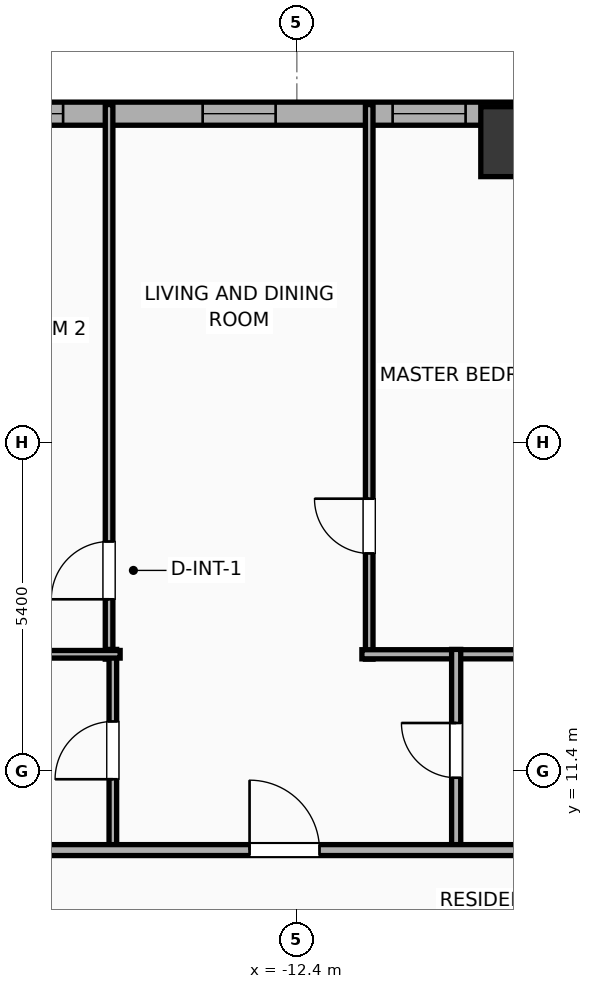
"""IFC4 building model, lengths in metres.
Left out: names, types, materials, properties, quantities, classifications, styles, units other than length and angle.
Written with IfcOpenShell. Run it as: python <this file> out.ifc"""

import sys

from ifc_helpers import new_model, si_unit, direction, frame, frame_2d, origin, origin_2d, place, context, subcontext, project, spatial, rectangle, hollow_rectangle, extrude, element, fill, save


model = new_model("IFC4")
c1 = context("Model", 3, precision=1e-05, world=origin(), true_north=direction((0.0, 1.0)))
c2 = subcontext(c1, "Body", "Model", "MODEL_VIEW")
j1 = project(units=[si_unit("LENGTHUNIT", "METRE"), si_unit("PLANEANGLEUNIT", "RADIAN")], contexts=[c1])
p1 = place(None, origin())
s1 = spatial("IfcSite", under=j1, at=p1, CompositionType="ELEMENT")
p2 = place(p1, origin())
s2 = spatial("IfcBuilding", under=s1, at=p2, CompositionType="ELEMENT")
p3 = place(p2, frame((0.0, 0.0, 41.6)))
s3 = spatial("IfcBuildingStorey", under=s2, at=p3, CompositionType="ELEMENT", Elevation=41.6)
p4 = place(p3, frame((-8.8, 21.75, 0.0), z_axis=(0.0, 0.0, 1.0), x_axis=(1.0, 0.0, 0.0)))
e1 = element("IfcColumn", 1, at=p4, inside=s3, PredefinedType="COLUMN", context=c2, shape_type="SweptSolid", body=[
    extrude(hollow_rectangle(XDim=1.15, YDim=1.15, WallThickness=0.04, at=origin_2d()), origin(), (0.0, 0.0, 1.0), 3.9),
])
p5 = place(p3, frame((-29.581, 22.21, 0.0), z_axis=(0.0, 0.0, 1.0), x_axis=(1.0, 0.0, 0.0)))
e2 = element("IfcWall", 2, at=p5, inside=s3, PredefinedType="ELEMENTEDWALL", context=c2, shape_type="SweptSolid", body=[
    extrude(rectangle(XDim=51.963, YDim=0.38, at=frame_2d((25.981, 0.0))), origin(), (0.0, 0.0, 1.0), 3.65),
])
p6 = place(p5, frame((25.631, 0.0, 0.75)))
e3 = element("IfcOpeningElement", 3, at=p6, cuts=e2, PredefinedType="OPENING", context=c2, shape_type="SweptSolid", body=[
    extrude(rectangle(XDim=2.4, YDim=2.1, at=frame_2d((1.2, 1.05))), frame((0.0, 0.2, 0.0), z_axis=(0.0, -1.0, 0.0), x_axis=(1.0, 0.0, 0.0)), (0.0, 0.0, 1.0), 0.4),
])
p7 = place(p5, frame((42.952, 0.0, 0.75)))
e4 = element("IfcOpeningElement", 4, at=p7, cuts=e2, PredefinedType="OPENING", context=c2, shape_type="SweptSolid", body=[
    extrude(rectangle(XDim=2.4, YDim=2.1, at=frame_2d((1.2, 1.05))), frame((0.0, 0.2, 0.0), z_axis=(0.0, -1.0, 0.0), x_axis=(1.0, 0.0, 0.0)), (0.0, 0.0, 1.0), 0.4),
])
p8 = place(p5, frame((1.731, 0.0, 0.75)))
e5 = element("IfcOpeningElement", 5, at=p8, cuts=e2, PredefinedType="OPENING", context=c2, shape_type="SweptSolid", body=[
    extrude(rectangle(XDim=1.2, YDim=2.05, at=frame_2d((0.6, 1.025))), frame((0.0, 0.2, 0.0), z_axis=(0.0, -1.0, 0.0), x_axis=(1.0, 0.0, 0.0)), (0.0, 0.0, 1.0), 0.4),
])
p9 = place(p5, frame((5.272, 0.0, 0.75)))
e6 = element("IfcOpeningElement", 6, at=p9, cuts=e2, PredefinedType="OPENING", context=c2, shape_type="SweptSolid", body=[
    extrude(rectangle(XDim=1.2, YDim=2.05, at=frame_2d((0.6, 1.025))), frame((0.0, 0.2, 0.0), z_axis=(0.0, -1.0, 0.0), x_axis=(1.0, 0.0, 0.0)), (0.0, 0.0, 1.0), 0.4),
])
p10 = place(p5, frame((8.356, 0.0, 0.75)))
e7 = element("IfcOpeningElement", 7, at=p10, cuts=e2, PredefinedType="OPENING", context=c2, shape_type="SweptSolid", body=[
    extrude(rectangle(XDim=1.2, YDim=2.05, at=frame_2d((0.6, 1.025))), frame((0.0, 0.2, 0.0), z_axis=(0.0, -1.0, 0.0), x_axis=(1.0, 0.0, 0.0)), (0.0, 0.0, 1.0), 0.4),
])
p11 = place(p5, frame((15.632, 0.0, 0.75)))
e8 = element("IfcOpeningElement", 8, at=p11, cuts=e2, PredefinedType="OPENING", context=c2, shape_type="SweptSolid", body=[
    extrude(rectangle(XDim=1.2, YDim=2.05, at=frame_2d((0.6, 1.025))), frame((0.0, 0.2, 0.0), z_axis=(0.0, -1.0, 0.0), x_axis=(1.0, 0.0, 0.0)), (0.0, 0.0, 1.0), 0.4),
])
p12 = place(p5, frame((12.137, 0.0, 0.75)))
e9 = element("IfcOpeningElement", 9, at=p12, cuts=e2, PredefinedType="OPENING", context=c2, shape_type="SweptSolid", body=[
    extrude(rectangle(XDim=1.2, YDim=2.05, at=frame_2d((0.6, 1.025))), frame((0.0, 0.2, 0.0), z_axis=(0.0, -1.0, 0.0), x_axis=(1.0, 0.0, 0.0)), (0.0, 0.0, 1.0), 0.4),
])
p13 = place(p5, frame((18.756, 0.0, 0.75)))
e10 = element("IfcOpeningElement", 10, at=p13, cuts=e2, PredefinedType="OPENING", context=c2, shape_type="SweptSolid", body=[
    extrude(rectangle(XDim=1.2, YDim=2.05, at=frame_2d((0.6, 1.025))), frame((0.0, 0.2, 0.0), z_axis=(0.0, -1.0, 0.0), x_axis=(1.0, 0.0, 0.0)), (0.0, 0.0, 1.0), 0.4),
])
p14 = place(p5, frame((22.907, 0.0, 0.75)))
e11 = element("IfcOpeningElement", 11, at=p14, cuts=e2, PredefinedType="OPENING", context=c2, shape_type="SweptSolid", body=[
    extrude(rectangle(XDim=1.2, YDim=2.05, at=frame_2d((0.6, 1.025))), frame((0.0, 0.2, 0.0), z_axis=(0.0, -1.0, 0.0), x_axis=(1.0, 0.0, 0.0)), (0.0, 0.0, 1.0), 0.4),
])
p15 = place(p5, frame((36.381, 0.0, 0.75)))
e12 = element("IfcOpeningElement", 12, at=p15, cuts=e2, PredefinedType="OPENING", context=c2, shape_type="SweptSolid", body=[
    extrude(rectangle(XDim=1.2, YDim=2.05, at=frame_2d((0.6, 1.025))), frame((0.0, 0.2, 0.0), z_axis=(0.0, -1.0, 0.0), x_axis=(1.0, 0.0, 0.0)), (0.0, 0.0, 1.0), 0.4),
])
p16 = place(p5, frame((32.886, 0.0, 0.75)))
e13 = element("IfcOpeningElement", 13, at=p16, cuts=e2, PredefinedType="OPENING", context=c2, shape_type="SweptSolid", body=[
    extrude(rectangle(XDim=1.2, YDim=2.05, at=frame_2d((0.6, 1.025))), frame((0.0, 0.2, 0.0), z_axis=(0.0, -1.0, 0.0), x_axis=(1.0, 0.0, 0.0)), (0.0, 0.0, 1.0), 0.4),
])
p17 = place(p5, frame((39.556, 0.0, 0.75)))
e14 = element("IfcOpeningElement", 14, at=p17, cuts=e2, PredefinedType="OPENING", context=c2, shape_type="SweptSolid", body=[
    extrude(rectangle(XDim=1.2, YDim=2.05, at=frame_2d((0.6, 1.025))), frame((0.0, 0.2, 0.0), z_axis=(0.0, -1.0, 0.0), x_axis=(1.0, 0.0, 0.0)), (0.0, 0.0, 1.0), 0.4),
])
p18 = place(p5, frame((46.885, 0.0, 0.75)))
e15 = element("IfcOpeningElement", 15, at=p18, cuts=e2, PredefinedType="OPENING", context=c2, shape_type="SweptSolid", body=[
    extrude(rectangle(XDim=1.2, YDim=2.05, at=frame_2d((0.6, 1.025))), frame((0.0, 0.2, 0.0), z_axis=(0.0, -1.0, 0.0), x_axis=(1.0, 0.0, 0.0)), (0.0, 0.0, 1.0), 0.4),
])
p19 = place(p5, frame((49.531, 0.0, 0.75)))
e16 = element("IfcOpeningElement", 16, at=p19, cuts=e2, PredefinedType="OPENING", context=c2, shape_type="SweptSolid", body=[
    extrude(rectangle(XDim=1.2, YDim=2.05, at=frame_2d((0.6, 1.025))), frame((0.0, 0.2, 0.0), z_axis=(0.0, -1.0, 0.0), x_axis=(1.0, 0.0, 0.0)), (0.0, 0.0, 1.0), 0.4),
])
p20 = place(p3, frame((-15.488, 13.24, 0.0), z_axis=(0.0, 0.0, 1.0), x_axis=(0.0, 1.0, 0.0)))
e17 = element("IfcWall", 17, at=p20, inside=s3, PredefinedType="PARTITIONING", context=c2, shape_type="SweptSolid", body=[
    extrude(rectangle(XDim=9.12, YDim=0.125, at=frame_2d((4.56, 0.0))), origin(), (0.0, 0.0, 1.0), 3.65),
])
p21 = place(p20, frame((0.984, 0.0, 0.0)))
e18 = element("IfcOpeningElement", 18, at=p21, cuts=e17, PredefinedType="OPENING", context=c2, shape_type="SweptSolid", body=[
    extrude(rectangle(XDim=0.95, YDim=2.05, at=frame_2d((0.475, 1.025))), frame((0.0, 0.073, 0.0), z_axis=(0.0, -1.0, 0.0), x_axis=(1.0, 0.0, 0.0)), (0.0, 0.0, 1.0), 0.145),
])
p22 = place(p3, frame((-11.21, 13.24, 0.0), z_axis=(0.0, 0.0, 1.0), x_axis=(0.0, 1.0, 0.0)))
e19 = element("IfcWall", 19, at=p22, inside=s3, PredefinedType="PARTITIONING", context=c2, shape_type="SweptSolid", body=[
    extrude(rectangle(XDim=9.12, YDim=0.125, at=frame_2d((4.56, 0.0))), origin(), (0.0, 0.0, 1.0), 3.65),
])
p23 = place(p22, frame((1.739, 0.0, 0.0)))
e20 = element("IfcOpeningElement", 20, at=p23, cuts=e19, PredefinedType="OPENING", context=c2, shape_type="SweptSolid", body=[
    extrude(rectangle(XDim=0.9, YDim=2.05, at=frame_2d((0.45, 1.025))), frame((0.0, 0.073, 0.0), z_axis=(0.0, -1.0, 0.0), x_axis=(1.0, 0.0, 0.0)), (0.0, 0.0, 1.0), 0.145),
])
p24 = place(p3, frame((-11.33, 13.32, 0.0), z_axis=(0.0, 0.0, 1.0), x_axis=(1.0, 0.0, 0.0)))
e21 = element("IfcWall", 21, at=p24, inside=s3, PredefinedType="PLUMBINGWALL", context=c2, shape_type="SweptSolid", body=[
    extrude(rectangle(XDim=3.79, YDim=0.15, at=frame_2d((1.895, 0.0))), origin(), (0.0, 0.0, 1.0), 3.65),
])
p25 = place(p3, frame((-15.426, 10.08, 0.0), z_axis=(0.0, 0.0, 1.0), x_axis=(0.0, 1.0, 0.0)))
e22 = element("IfcWall", 22, at=p25, inside=s3, PredefinedType="PARTITIONING", context=c2, shape_type="SweptSolid", body=[
    extrude(rectangle(XDim=3.32, YDim=0.125, at=frame_2d((1.66, 0.0))), origin(), (0.0, 0.0, 1.0), 3.65),
])
p26 = place(p25, frame((1.185, 0.0, 0.0)))
e23 = element("IfcOpeningElement", 23, at=p26, cuts=e22, PredefinedType="OPENING", context=c2, shape_type="SweptSolid", body=[
    extrude(rectangle(XDim=0.95, YDim=2.05, at=frame_2d((0.475, 1.025))), frame((0.0, 0.073, 0.0), z_axis=(0.0, -1.0, 0.0), x_axis=(1.0, 0.0, 0.0)), (0.0, 0.0, 1.0), 0.145),
])
p27 = place(p3, frame((-18.275, 13.32, 0.0), z_axis=(0.0, 0.0, 1.0), x_axis=(1.0, 0.0, 0.0)))
e24 = element("IfcWall", 24, at=p27, inside=s3, PredefinedType="PARTITIONING", context=c2, shape_type="SweptSolid", body=[
    extrude(rectangle(XDim=2.969, YDim=0.125, at=frame_2d((1.484, 0.0))), origin(), (0.0, 0.0, 1.0), 3.65),
])
p28 = place(p3, frame((-9.78, 10.08, 0.0), z_axis=(0.0, 0.0, 1.0), x_axis=(0.0, 1.0, 0.0)))
e25 = element("IfcWall", 25, at=p28, inside=s3, PredefinedType="PLUMBINGWALL", context=c2, shape_type="SweptSolid", body=[
    extrude(rectangle(XDim=3.32, YDim=0.15, at=frame_2d((1.66, 0.0))), origin(), (0.0, 0.0, 1.0), 3.65),
])
p29 = place(p28, frame((1.21, 0.0, 0.0)))
e26 = element("IfcOpeningElement", 26, at=p29, cuts=e25, PredefinedType="OPENING", context=c2, shape_type="SweptSolid", body=[
    extrude(rectangle(XDim=0.9, YDim=2.05, at=frame_2d((0.45, 1.025))), frame((0.0, 0.085, 0.0), z_axis=(0.0, -1.0, 0.0), x_axis=(1.0, 0.0, 0.0)), (0.0, 0.0, 1.0), 0.17),
])
p30 = place(p3, frame((-33.41, 10.1, 0.0), z_axis=(0.0, 0.0, 1.0), x_axis=(1.0, 0.0, 0.0)))
e27 = element("IfcWall", 27, at=p30, inside=s3, PredefinedType="PARTITIONING", context=c2, shape_type="SweptSolid", body=[
    extrude(rectangle(XDim=59.62, YDim=0.18, at=frame_2d((29.81, 0.0))), origin(), (0.0, 0.0, 1.0), 3.65),
])
p31 = place(p30, frame((3.354, 0.0, 0.0)))
e28 = element("IfcOpeningElement", 28, at=p31, cuts=e27, PredefinedType="OPENING", context=c2, shape_type="SweptSolid", body=[
    extrude(rectangle(XDim=1.15, YDim=2.05, at=frame_2d((0.575, 1.025))), frame((0.0, 0.1, 0.0), z_axis=(0.0, -1.0, 0.0), x_axis=(1.0, 0.0, 0.0)), (0.0, 0.0, 1.0), 0.2),
])
p32 = place(p30, frame((10.997, 0.0, 0.0)))
e29 = element("IfcOpeningElement", 29, at=p32, cuts=e27, PredefinedType="OPENING", context=c2, shape_type="SweptSolid", body=[
    extrude(rectangle(XDim=1.15, YDim=2.05, at=frame_2d((0.575, 1.025))), frame((0.0, 0.1, 0.0), z_axis=(0.0, -1.0, 0.0), x_axis=(1.0, 0.0, 0.0)), (0.0, 0.0, 1.0), 0.2),
])
p33 = place(p30, frame((20.232, 0.0, 0.0)))
e30 = element("IfcOpeningElement", 30, at=p33, cuts=e27, PredefinedType="OPENING", context=c2, shape_type="SweptSolid", body=[
    extrude(rectangle(XDim=1.15, YDim=2.05, at=frame_2d((0.575, 1.025))), frame((0.0, 0.1, 0.0), z_axis=(0.0, -1.0, 0.0), x_axis=(1.0, 0.0, 0.0)), (0.0, 0.0, 1.0), 0.2),
])
p34 = place(p30, frame((30.38, 0.0, 0.0)))
e31 = element("IfcOpeningElement", 31, at=p34, cuts=e27, PredefinedType="OPENING", context=c2, shape_type="SweptSolid", body=[
    extrude(rectangle(XDim=1.15, YDim=2.05, at=frame_2d((0.575, 1.025))), frame((0.0, 0.1, 0.0), z_axis=(0.0, -1.0, 0.0), x_axis=(1.0, 0.0, 0.0)), (0.0, 0.0, 1.0), 0.2),
])
p35 = place(p30, frame((40.998, 0.0, 0.0)))
e32 = element("IfcOpeningElement", 32, at=p35, cuts=e27, PredefinedType="OPENING", context=c2, shape_type="SweptSolid", body=[
    extrude(rectangle(XDim=1.15, YDim=2.05, at=frame_2d((0.575, 1.025))), frame((0.0, 0.1, 0.0), z_axis=(0.0, -1.0, 0.0), x_axis=(1.0, 0.0, 0.0)), (0.0, 0.0, 1.0), 0.2),
])
p36 = place(p30, frame((49.428, 0.0, 0.0)))
e33 = element("IfcOpeningElement", 33, at=p36, cuts=e27, PredefinedType="OPENING", context=c2, shape_type="SweptSolid", body=[
    extrude(rectangle(XDim=0.9, YDim=2.05, at=frame_2d((0.45, 1.025))), frame((0.0, 0.1, 0.0), z_axis=(0.0, -1.0, 0.0), x_axis=(1.0, 0.0, 0.0)), (0.0, 0.0, 1.0), 0.2),
])
p37 = place(p30, frame((56.07, 0.0, 0.0)))
e34 = element("IfcOpeningElement", 34, at=p37, cuts=e27, PredefinedType="OPENING", context=c2, shape_type="SweptSolid", body=[
    extrude(rectangle(XDim=0.9, YDim=2.05, at=frame_2d((0.45, 1.025))), frame((0.0, 0.1, 0.0), z_axis=(0.0, -1.0, 0.0), x_axis=(1.0, 0.0, 0.0)), (0.0, 0.0, 1.0), 0.2),
])
p38 = place(p11, origin())
e35 = element("IfcWindow", 35, at=p38, inside=s3, PartitioningType="SINGLE_PANEL", PredefinedType="WINDOW", context=c2, shape_type="SweptSolid", body=[
    extrude(rectangle(XDim=1.2, YDim=2.05, at=frame_2d((0.6, 1.025))), frame((0.0, 0.03, 0.0), z_axis=(0.0, -1.0, 0.0), x_axis=(1.0, 0.0, 0.0)), (0.0, 0.0, 1.0), 0.06),
])
fill(e8, e35)
p39 = place(p12, origin())
e36 = element("IfcWindow", 36, at=p39, inside=s3, PartitioningType="SINGLE_PANEL", PredefinedType="WINDOW", context=c2, shape_type="SweptSolid", body=[
    extrude(rectangle(XDim=1.2, YDim=2.05, at=frame_2d((0.6, 1.025))), frame((0.0, 0.03, 0.0), z_axis=(0.0, -1.0, 0.0), x_axis=(1.0, 0.0, 0.0)), (0.0, 0.0, 1.0), 0.06),
])
fill(e9, e36)
p40 = place(p13, origin())
e37 = element("IfcWindow", 37, at=p40, inside=s3, PartitioningType="SINGLE_PANEL", PredefinedType="WINDOW", context=c2, shape_type="SweptSolid", body=[
    extrude(rectangle(XDim=1.2, YDim=2.05, at=frame_2d((0.6, 1.025))), frame((0.0, 0.03, 0.0), z_axis=(0.0, -1.0, 0.0), x_axis=(1.0, 0.0, 0.0)), (0.0, 0.0, 1.0), 0.06),
])
fill(e10, e37)
p41 = place(p21, origin())
e38 = element("IfcDoor", 38, at=p41, inside=s3, OperationType="SINGLE_SWING_LEFT", PredefinedType="DOOR", context=c2, shape_type="SweptSolid", body=[
    extrude(rectangle(XDim=0.95, YDim=2.05, at=frame_2d((0.475, 1.025))), frame((0.0, 0.025, 0.0), z_axis=(0.0, -1.0, 0.0), x_axis=(1.0, 0.0, 0.0)), (0.0, 0.0, 1.0), 0.05),
])
fill(e18, e38)
p42 = place(p23, origin())
e39 = element("IfcDoor", 39, at=p42, inside=s3, OperationType="SINGLE_SWING_RIGHT", PredefinedType="DOOR", context=c2, shape_type="SweptSolid", body=[
    extrude(rectangle(XDim=0.9, YDim=2.05, at=frame_2d((0.45, 1.025))), frame((0.0, 0.025, 0.0), z_axis=(0.0, -1.0, 0.0), x_axis=(1.0, 0.0, 0.0)), (0.0, 0.0, 1.0), 0.05),
])
fill(e20, e39)
p43 = place(p26, origin())
e40 = element("IfcDoor", 40, at=p43, inside=s3, OperationType="SINGLE_SWING_LEFT", PredefinedType="DOOR", context=c2, shape_type="SweptSolid", body=[
    extrude(rectangle(XDim=0.95, YDim=2.05, at=frame_2d((0.475, 1.025))), frame((0.0, 0.025, 0.0), z_axis=(0.0, -1.0, 0.0), x_axis=(1.0, 0.0, 0.0)), (0.0, 0.0, 1.0), 0.05),
])
fill(e23, e40)
p44 = place(p29, origin())
e41 = element("IfcDoor", 41, at=p44, inside=s3, OperationType="SINGLE_SWING_RIGHT", PredefinedType="DOOR", context=c2, shape_type="SweptSolid", body=[
    extrude(rectangle(XDim=0.9, YDim=2.05, at=frame_2d((0.45, 1.025))), frame((0.0, 0.025, 0.0), z_axis=(0.0, -1.0, 0.0), x_axis=(1.0, 0.0, 0.0)), (0.0, 0.0, 1.0), 0.05),
])
fill(e26, e41)
p45 = place(p33, origin())
e42 = element("IfcDoor", 42, at=p45, inside=s3, OperationType="SINGLE_SWING_LEFT", PredefinedType="DOOR", context=c2, shape_type="SweptSolid", body=[
    extrude(rectangle(XDim=1.15, YDim=2.05, at=frame_2d((0.575, 1.025))), frame((0.0, 0.025, 0.0), z_axis=(0.0, -1.0, 0.0), x_axis=(1.0, 0.0, 0.0)), (0.0, 0.0, 1.0), 0.05),
])
fill(e30, e42)
save(model, sys.argv[1])
